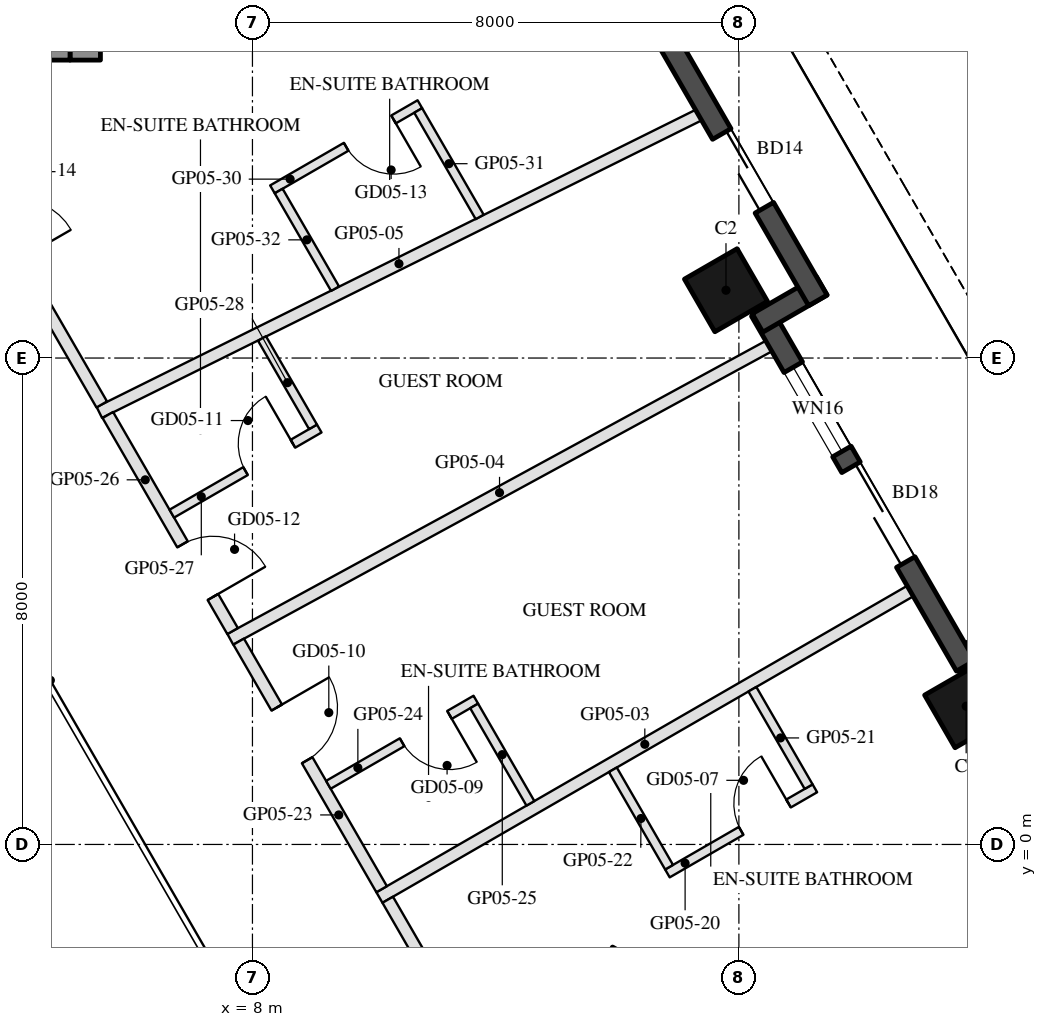
"""IFC4 building model, lengths in metres.
Left out: names, types, materials, properties, quantities, classifications, styles, units other than length and angle.
Written with IfcOpenShell. Run it as: python <this file> out.ifc"""

import sys

from ifc_helpers import new_model, si_unit, direction, frame, frame_2d, origin, origin_2d, place, context, subcontext, project, spatial, rectangle, hollow_rectangle, extrude, element, fill, save


model = new_model("IFC4")
c1 = context("Model", 3, precision=1e-05, world=origin(), true_north=direction((0.0, 1.0)))
c2 = subcontext(c1, "Body", "Model", "MODEL_VIEW")
j1 = project(units=[si_unit("LENGTHUNIT", "METRE"), si_unit("PLANEANGLEUNIT", "RADIAN")], contexts=[c1])
p1 = place(None, origin())
s1 = spatial("IfcSite", under=j1, at=p1, CompositionType="ELEMENT")
p2 = place(p1, origin())
s2 = spatial("IfcBuilding", under=s1, at=p2, CompositionType="ELEMENT")
p3 = place(p2, frame((0.0, 0.0, 79.8)))
s3 = spatial("IfcBuildingStorey", under=s2, at=p3, CompositionType="ELEMENT", Elevation=79.8)
for number, where, z_axis, x_axis in (
    (1, (19.738, 2.273, 0.0), (0.0, 0.0, 1.0), (-0.5, 0.866, 0.0)),
    (2, (15.788, 9.115, 0.0), (0.0, 0.0, 1.0), (-0.5, 0.866, 0.0)),
):
    element("IfcColumn", number, at=place(p3, frame(where, z_axis=z_axis, x_axis=x_axis)), inside=s3, PredefinedType="COLUMN", context=c2, shape_type="SweptSolid", body=[
        extrude(hollow_rectangle(XDim=1.0, YDim=1.0, WallThickness=0.045, at=origin_2d()), origin(), (0.0, 0.0, 1.0), 3.7),
    ])
p4 = place(p3, frame((20.588, 3.601, 0.0), z_axis=(0.0, 0.0, 1.0), x_axis=(-0.866005645448, -0.500034220881, 0.0)))
e3 = element("IfcWall", 3, at=p4, inside=s3, PredefinedType="SOLIDWALL", context=c2, shape_type="SweptSolid", body=[
    extrude(rectangle(XDim=1.22, YDim=0.35, at=frame_2d((0.61, 0.0))), origin(), (0.0, 0.0, 1.0), 3.55),
])
p5 = place(p3, frame((19.729, 2.938, 0.0), z_axis=(0.0, 0.0, 1.0), x_axis=(-0.499976430342, 0.866039011305, 0.0)))
e4 = element("IfcWall", 4, at=p5, inside=s3, PredefinedType="SOLIDWALL", context=c2, shape_type="SweptSolid", body=[
    extrude(rectangle(XDim=6.74, YDim=0.35, at=frame_2d((3.37, 0.0))), origin(), (0.0, 0.0, 1.0), 3.55),
])
p6 = place(p5, frame((1.97, 0.0, 0.0)))
e5 = element("IfcOpeningElement", 5, at=p6, cuts=e4, PredefinedType="OPENING", context=c2, shape_type="SweptSolid", body=[
    extrude(rectangle(XDim=1.8, YDim=2.4, at=frame_2d((0.9, 1.2))), frame((0.0, 0.185, 0.0), z_axis=(0.0, -1.0, 0.0), x_axis=(1.0, 0.0, 0.0)), (0.0, 0.0, 1.0), 0.37),
])
p7 = place(p5, frame((4.07, 0.0, 0.3)))
e6 = element("IfcOpeningElement", 6, at=p7, cuts=e4, PredefinedType="OPENING", context=c2, shape_type="SweptSolid", body=[
    extrude(rectangle(XDim=1.6, YDim=2.65, at=frame_2d((0.8, 1.325))), frame((0.0, 0.185, 0.0), z_axis=(0.0, -1.0, 0.0), x_axis=(1.0, 0.0, 0.0)), (0.0, 0.0, 1.0), 0.37),
])
p8 = place(p3, frame((16.306, 8.577, 0.0), z_axis=(0.0, 0.0, 1.0), x_axis=(0.866092288191, 0.499884134912, 0.0)))
e7 = element("IfcWall", 7, at=p8, inside=s3, PredefinedType="SOLIDWALL", context=c2, shape_type="SweptSolid", body=[
    extrude(rectangle(XDim=1.22, YDim=0.35, at=frame_2d((0.61, 0.0))), origin(), (0.0, 0.0, 1.0), 3.55),
])
p9 = place(p3, frame((17.299, 8.948, 0.0), z_axis=(0.0, 0.0, 1.0), x_axis=(-0.500010041276, 0.866019606374, 0.0)))
e8 = element("IfcWall", 8, at=p9, inside=s3, PredefinedType="SOLIDWALL", context=c2, shape_type="SweptSolid", body=[
    extrude(rectangle(XDim=9.7, YDim=0.35, at=frame_2d((4.85, 0.0))), origin(), (0.0, 0.0, 1.0), 3.55),
])
p10 = place(p9, frame((1.76, 0.0, 0.0)))
e9 = element("IfcOpeningElement", 9, at=p10, cuts=e8, PredefinedType="OPENING", context=c2, shape_type="SweptSolid", body=[
    extrude(rectangle(XDim=1.4, YDim=2.4, at=frame_2d((0.7, 1.2))), frame((0.0, 0.185, 0.0), z_axis=(0.0, -1.0, 0.0), x_axis=(1.0, 0.0, 0.0)), (0.0, 0.0, 1.0), 0.37),
])
p11 = place(p9, frame((4.949, 0.0, 0.3)))
e10 = element("IfcOpeningElement", 10, at=p11, cuts=e8, PredefinedType="OPENING", context=c2, shape_type="SweptSolid", body=[
    extrude(rectangle(XDim=3.0, YDim=2.65, at=frame_2d((1.5, 1.325))), frame((0.0, 0.185, 0.0), z_axis=(0.0, -1.0, 0.0), x_axis=(1.0, 0.0, 0.0)), (0.0, 0.0, 1.0), 0.37),
])
p12 = place(p3, frame((5.25, 12.9, 0.0), z_axis=(0.0, 0.0, 1.0), x_axis=(0.0, 1.0, 0.0)))
e11 = element("IfcWall", 11, at=p12, inside=s3, PredefinedType="SHEAR", context=c2, shape_type="SweptSolid", body=[
    extrude(rectangle(XDim=14.837, YDim=0.5, at=frame_2d((7.418, 0.0))), origin(), (0.0, 0.0, 1.0), 3.5),
])
p13 = place(p3, frame((5.0, 13.1, 0.0), z_axis=(0.0, 0.0, 1.0), x_axis=(-1.0, 0.0, 0.0)))
e12 = element("IfcWall", 12, at=p13, inside=s3, PredefinedType="SHEAR", context=c2, shape_type="SweptSolid", body=[
    extrude(rectangle(XDim=10.0, YDim=0.4, at=frame_2d((5.0, 0.0))), origin(), (0.0, 0.0, 1.0), 3.5),
])
p14 = place(p13, frame((3.55, 0.0, 0.0)))
e13 = element("IfcOpeningElement", 13, at=p14, cuts=e12, PredefinedType="OPENING", context=c2, shape_type="SweptSolid", body=[
    extrude(rectangle(XDim=1.1, YDim=2.1, at=frame_2d((0.55, 1.05))), frame((0.0, 0.21, 0.0), z_axis=(0.0, -1.0, 0.0), x_axis=(1.0, 0.0, 0.0)), (0.0, 0.0, 1.0), 0.42),
])
p15 = place(p13, frame((5.85, 0.0, 0.0)))
e14 = element("IfcOpeningElement", 14, at=p15, cuts=e12, PredefinedType="OPENING", context=c2, shape_type="SweptSolid", body=[
    extrude(rectangle(XDim=1.4, YDim=2.1, at=frame_2d((0.7, 1.05))), frame((0.0, 0.21, 0.0), z_axis=(0.0, -1.0, 0.0), x_axis=(1.0, 0.0, 0.0)), (0.0, 0.0, 1.0), 0.42),
])
p16 = place(p3, frame((18.818, 4.167, 0.0), z_axis=(0.0, 0.0, 1.0), x_axis=(-0.866039179741, -0.499976138585, 0.0)))
e15 = element("IfcWall", 15, at=p16, inside=s3, PredefinedType="PARTITIONING", context=c2, shape_type="SweptSolid", body=[
    extrude(rectangle(XDim=10.08, YDim=0.2, at=frame_2d((5.04, 0.0))), origin(), (0.0, 0.0, 1.0), 2.96),
])
p17 = place(p3, frame((16.491, 8.196, 0.0), z_axis=(0.0, 0.0, 1.0), x_axis=(-0.878274684292, -0.478156437719, 0.0)))
e16 = element("IfcWall", 16, at=p17, inside=s3, PredefinedType="PARTITIONING", context=c2, shape_type="SweptSolid", body=[
    extrude(rectangle(XDim=10.083, YDim=0.2, at=frame_2d((5.042, 0.0))), origin(), (0.0, 0.0, 1.0), 2.96),
])
p18 = place(p3, frame((15.337, 11.996, 0.0), z_axis=(0.0, 0.0, 1.0), x_axis=(-0.895785569399, -0.4444864606, 0.0)))
e17 = element("IfcWall", 17, at=p18, inside=s3, PredefinedType="PARTITIONING", context=c2, shape_type="SweptSolid", body=[
    extrude(rectangle(XDim=11.002, YDim=0.2, at=frame_2d((5.501, 0.0))), origin(), (0.0, 0.0, 1.0), 2.96),
])
p19 = place(p3, frame((10.225, -0.909, 0.0), z_axis=(0.0, 0.0, 1.0), x_axis=(0.500011931275, -0.86601851515, 0.0)))
e18 = element("IfcWall", 18, at=p19, inside=s3, PredefinedType="PARTITIONING", context=c2, shape_type="SweptSolid", body=[
    extrude(rectangle(XDim=4.088, YDim=0.2, at=frame_2d((2.044, 0.0))), origin(), (0.0, 0.0, 1.0), 2.95),
])
p20 = place(p19, frame((1.544, 0.0, 0.0)))
e19 = element("IfcOpeningElement", 19, at=p20, cuts=e18, PredefinedType="OPENING", context=c2, shape_type="SweptSolid", body=[
    extrude(rectangle(XDim=1.0, YDim=2.1, at=frame_2d((0.5, 1.05))), frame((0.0, 0.11, 0.0), z_axis=(0.0, -1.0, 0.0), x_axis=(1.0, 0.0, 0.0)), (0.0, 0.0, 1.0), 0.22),
])
p21 = place(p3, frame((14.824, -0.477, 0.0), z_axis=(0.0, 0.0, 1.0), x_axis=(0.866034573852, 0.49998411664, 0.0)))
e20 = element("IfcWall", 20, at=p21, inside=s3, PredefinedType="PARTITIONING", context=c2, shape_type="SweptSolid", body=[
    extrude(rectangle(XDim=2.8, YDim=0.15, at=frame_2d((1.4, 0.0))), origin(), (0.0, 0.0, 1.0), 2.95),
])
p22 = place(p21, frame((1.4, 0.0, 0.0)))
e21 = element("IfcOpeningElement", 21, at=p22, cuts=e20, PredefinedType="OPENING", context=c2, shape_type="SweptSolid", body=[
    extrude(rectangle(XDim=0.9, YDim=2.1, at=frame_2d((0.45, 1.05))), frame((0.0, 0.085, 0.0), z_axis=(0.0, -1.0, 0.0), x_axis=(1.0, 0.0, 0.0)), (0.0, 0.0, 1.0), 0.17),
])
for number, where, z_axis, x_axis in (
    (22, (17.147, 0.951, 0.0), (0.0, 0.0, 1.0), (-0.5, 0.866, 0.0)),
    (23, (14.852, -0.374, 0.0), (0.0, 0.0, 1.0), (-0.5, 0.866, 0.0)),
):
    element("IfcWall", number, at=place(p3, frame(where, z_axis=z_axis, x_axis=x_axis)), inside=s3, PredefinedType="PARTITIONING", context=c2, shape_type="SweptSolid", body=[
        extrude(rectangle(XDim=1.85, YDim=0.15, at=frame_2d((0.925, 0.0))), origin(), (0.0, 0.0, 1.0), 3.55),
    ])
p23 = place(p3, frame((7.773, 3.336, 0.0), z_axis=(0.0, 0.0, 1.0), x_axis=(0.499969633922, -0.866042934938, 0.0)))
e24 = element("IfcWall", 24, at=p23, inside=s3, PredefinedType="PARTITIONING", context=c2, shape_type="SweptSolid", body=[
    extrude(rectangle(XDim=4.702, YDim=0.2, at=frame_2d((2.351, 0.0))), origin(), (0.0, 0.0, 1.0), 2.95),
])
p24 = place(p23, frame((1.252, 0.0, 0.0)))
e25 = element("IfcOpeningElement", 25, at=p24, cuts=e24, PredefinedType="OPENING", context=c2, shape_type="SweptSolid", body=[
    extrude(rectangle(XDim=1.0, YDim=2.1, at=frame_2d((0.5, 1.05))), frame((0.0, 0.11, 0.0), z_axis=(0.0, -1.0, 0.0), x_axis=(1.0, 0.0, 0.0)), (0.0, 0.0, 1.0), 0.22),
])
p25 = place(p3, frame((11.674, 2.381, 0.0), z_axis=(0.0, 0.0, 1.0), x_axis=(-0.865996816683, -0.500049511043, 0.0)))
e26 = element("IfcWall", 26, at=p25, inside=s3, PredefinedType="PARTITIONING", context=c2, shape_type="SweptSolid", body=[
    extrude(rectangle(XDim=2.8, YDim=0.15, at=frame_2d((1.4, 0.0))), origin(), (0.0, 0.0, 1.0), 2.95),
])
p26 = place(p25, frame((0.5, 0.0, 0.0)))
e27 = element("IfcOpeningElement", 27, at=p26, cuts=e26, PredefinedType="OPENING", context=c2, shape_type="SweptSolid", body=[
    extrude(rectangle(XDim=0.9, YDim=2.1, at=frame_2d((0.45, 1.05))), frame((0.0, 0.085, 0.0), z_axis=(0.0, -1.0, 0.0), x_axis=(1.0, 0.0, 0.0)), (0.0, 0.0, 1.0), 0.17),
])
p27 = place(p3, frame((12.571, 0.676, 0.0), z_axis=(0.0, 0.0, 1.0), x_axis=(-0.500042316284, 0.866000971088, 0.0)))
e28 = element("IfcWall", 28, at=p27, inside=s3, PredefinedType="PARTITIONING", context=c2, shape_type="SweptSolid", body=[
    extrude(rectangle(XDim=1.85, YDim=0.15, at=frame_2d((0.925, 0.0))), origin(), (0.0, 0.0, 1.0), 2.95),
])
p28 = place(p3, frame((5.622, 7.063, 0.0), z_axis=(0.0, 0.0, 1.0), x_axis=(0.500003992843, -0.866023098503, 0.0)))
e29 = element("IfcWall", 29, at=p28, inside=s3, PredefinedType="PARTITIONING", context=c2, shape_type="SweptSolid", body=[
    extrude(rectangle(XDim=4.104, YDim=0.2, at=frame_2d((2.052, 0.0))), origin(), (0.0, 0.0, 1.0), 2.95),
])
p29 = place(p28, frame((2.456, 0.0, 0.0)))
e30 = element("IfcOpeningElement", 30, at=p29, cuts=e29, PredefinedType="OPENING", context=c2, shape_type="SweptSolid", body=[
    extrude(rectangle(XDim=1.0, YDim=2.1, at=frame_2d((0.5, 1.05))), frame((0.0, 0.11, 0.0), z_axis=(0.0, -1.0, 0.0), x_axis=(1.0, 0.0, 0.0)), (0.0, 0.0, 1.0), 0.22),
])
p30 = place(p3, frame((6.674, 5.441, 0.0), z_axis=(0.0, 0.0, 1.0), x_axis=(0.866034573852, 0.49998411664, 0.0)))
e31 = element("IfcWall", 31, at=p30, inside=s3, PredefinedType="PARTITIONING", context=c2, shape_type="SweptSolid", body=[
    extrude(rectangle(XDim=2.8, YDim=0.15, at=frame_2d((1.4, 0.0))), origin(), (0.0, 0.0, 1.0), 3.55),
])
p31 = place(p30, frame((1.4, 0.0, 0.0)))
e32 = element("IfcOpeningElement", 32, at=p31, cuts=e31, PredefinedType="OPENING", context=c2, shape_type="SweptSolid", body=[
    extrude(rectangle(XDim=0.9, YDim=2.1, at=frame_2d((0.45, 1.05))), frame((0.0, 0.085, 0.0), z_axis=(0.0, -1.0, 0.0), x_axis=(1.0, 0.0, 0.0)), (0.0, 0.0, 1.0), 0.17),
])
p32 = place(p3, frame((8.996, 6.868, 0.0), z_axis=(0.0, 0.0, 1.0), x_axis=(-0.499957569697, 0.866049899545, 0.0)))
e33 = element("IfcWall", 33, at=p32, inside=s3, PredefinedType="PARTITIONING", context=c2, shape_type="SweptSolid", body=[
    extrude(rectangle(XDim=1.678, YDim=0.15, at=frame_2d((0.839, 0.0))), origin(), (0.0, 0.0, 1.0), 3.55),
])
p33 = place(p3, frame((2.281, 12.85, 0.0), z_axis=(0.0, 0.0, 1.0), x_axis=(0.500015893381, -0.866016227542, 0.0)))
e34 = element("IfcWall", 34, at=p33, inside=s3, PredefinedType="PARTITIONING", context=c2, shape_type="SweptSolid", body=[
    extrude(rectangle(XDim=6.482, YDim=0.2, at=frame_2d((3.241, 0.0))), origin(), (0.0, 0.0, 1.0), 2.95),
])
p34 = place(p33, frame((2.741, 0.0, 0.0)))
e35 = element("IfcOpeningElement", 35, at=p34, cuts=e34, PredefinedType="OPENING", context=c2, shape_type="SweptSolid", body=[
    extrude(rectangle(XDim=1.0, YDim=2.1, at=frame_2d((0.5, 1.05))), frame((0.0, 0.11, 0.0), z_axis=(0.0, -1.0, 0.0), x_axis=(1.0, 0.0, 0.0)), (0.0, 0.0, 1.0), 0.22),
])
p35 = place(p3, frame((10.753, 12.174, 0.0), z_axis=(0.0, 0.0, 1.0), x_axis=(-0.866034573852, -0.49998411664, 0.0)))
e36 = element("IfcWall", 36, at=p35, inside=s3, PredefinedType="PARTITIONING", context=c2, shape_type="SweptSolid", body=[
    extrude(rectangle(XDim=2.8, YDim=0.15, at=frame_2d((1.4, 0.0))), origin(), (0.0, 0.0, 1.0), 3.55),
])
p36 = place(p35, frame((0.5, 0.0, 0.0)))
e37 = element("IfcOpeningElement", 37, at=p36, cuts=e36, PredefinedType="OPENING", context=c2, shape_type="SweptSolid", body=[
    extrude(rectangle(XDim=0.9, YDim=2.1, at=frame_2d((0.45, 1.05))), frame((0.0, 0.085, 0.0), z_axis=(0.0, -1.0, 0.0), x_axis=(1.0, 0.0, 0.0)), (0.0, 0.0, 1.0), 0.17),
])
p37 = place(p3, frame((11.737, 10.321, 0.0), z_axis=(0.0, 0.0, 1.0), x_axis=(-0.499969802211, 0.866042837784, 0.0)))
e38 = element("IfcWall", 38, at=p37, inside=s3, PredefinedType="PARTITIONING", context=c2, shape_type="SweptSolid", body=[
    extrude(rectangle(XDim=2.022, YDim=0.15, at=frame_2d((1.011, 0.0))), origin(), (0.0, 0.0, 1.0), 2.95),
])
p38 = place(p3, frame((9.358, 9.141, 0.0), z_axis=(0.0, 0.0, 1.0), x_axis=(-0.49996174997, 0.866047486323, 0.0)))
e39 = element("IfcWall", 39, at=p38, inside=s3, PredefinedType="PARTITIONING", context=c2, shape_type="SweptSolid", body=[
    extrude(rectangle(XDim=1.855, YDim=0.15, at=frame_2d((0.927, 0.0))), origin(), (0.0, 0.0, 1.0), 2.95),
])
p39 = place(p6, frame((1.8, 0.0, 0.0), z_axis=(0.0, 0.0, 1.0), x_axis=(-1.0, 0.0, 0.0)))
e40 = element("IfcDoor", 40, at=p39, inside=s3, OperationType="SLIDING_TO_LEFT", PredefinedType="DOOR", context=c2, shape_type="SweptSolid", body=[
    extrude(rectangle(XDim=1.8, YDim=2.4, at=frame_2d((0.9, 1.2))), frame((0.0, 0.025, 0.0), z_axis=(0.0, -1.0, 0.0), x_axis=(1.0, 0.0, 0.0)), (0.0, 0.0, 1.0), 0.05),
])
fill(e5, e40)
p40 = place(p7, origin())
e41 = element("IfcWindow", 41, at=p40, inside=s3, PartitioningType="SINGLE_PANEL", PredefinedType="WINDOW", context=c2, shape_type="SweptSolid", body=[
    extrude(rectangle(XDim=1.6, YDim=2.65, at=frame_2d((0.8, 1.325))), frame((0.0, 0.03, 0.0), z_axis=(0.0, -1.0, 0.0), x_axis=(1.0, 0.0, 0.0)), (0.0, 0.0, 1.0), 0.06),
])
fill(e6, e41)
p41 = place(p10, frame((1.4, 0.0, 0.0), z_axis=(0.0, 0.0, 1.0), x_axis=(-1.0, 0.0, 0.0)))
e42 = element("IfcDoor", 42, at=p41, inside=s3, OperationType="SLIDING_TO_LEFT", PredefinedType="DOOR", context=c2, shape_type="SweptSolid", body=[
    extrude(rectangle(XDim=1.4, YDim=2.4, at=frame_2d((0.7, 1.2))), frame((0.0, 0.025, 0.0), z_axis=(0.0, -1.0, 0.0), x_axis=(1.0, 0.0, 0.0)), (0.0, 0.0, 1.0), 0.05),
])
fill(e9, e42)
p42 = place(p22, origin())
e43 = element("IfcDoor", 43, at=p42, inside=s3, OperationType="SINGLE_SWING_RIGHT", PredefinedType="DOOR", context=c2, shape_type="SweptSolid", body=[
    extrude(rectangle(XDim=0.9, YDim=2.1, at=frame_2d((0.45, 1.05))), frame((0.0, 0.025, 0.0), z_axis=(0.0, -1.0, 0.0), x_axis=(1.0, 0.0, 0.0)), (0.0, 0.0, 1.0), 0.05),
])
fill(e21, e43)
p43 = place(p26, origin())
e44 = element("IfcDoor", 44, at=p43, inside=s3, OperationType="SINGLE_SWING_LEFT", PredefinedType="DOOR", context=c2, shape_type="SweptSolid", body=[
    extrude(rectangle(XDim=0.9, YDim=2.1, at=frame_2d((0.45, 1.05))), frame((0.0, 0.025, 0.0), z_axis=(0.0, -1.0, 0.0), x_axis=(1.0, 0.0, 0.0)), (0.0, 0.0, 1.0), 0.05),
])
fill(e27, e44)
p44 = place(p24, origin())
e45 = element("IfcDoor", 45, at=p44, inside=s3, OperationType="SINGLE_SWING_LEFT", PredefinedType="DOOR", context=c2, shape_type="SweptSolid", body=[
    extrude(rectangle(XDim=1.0, YDim=2.1, at=frame_2d((0.5, 1.05))), frame((0.0, 0.025, 0.0), z_axis=(0.0, -1.0, 0.0), x_axis=(1.0, 0.0, 0.0)), (0.0, 0.0, 1.0), 0.05),
])
fill(e25, e45)
p45 = place(p31, origin())
e46 = element("IfcDoor", 46, at=p45, inside=s3, OperationType="SINGLE_SWING_RIGHT", PredefinedType="DOOR", context=c2, shape_type="SweptSolid", body=[
    extrude(rectangle(XDim=0.9, YDim=2.1, at=frame_2d((0.45, 1.05))), frame((0.0, 0.025, 0.0), z_axis=(0.0, -1.0, 0.0), x_axis=(1.0, 0.0, 0.0)), (0.0, 0.0, 1.0), 0.05),
])
fill(e32, e46)
p46 = place(p29, origin())
e47 = element("IfcDoor", 47, at=p46, inside=s3, OperationType="SINGLE_SWING_RIGHT", PredefinedType="DOOR", context=c2, shape_type="SweptSolid", body=[
    extrude(rectangle(XDim=1.0, YDim=2.1, at=frame_2d((0.5, 1.05))), frame((0.0, 0.025, 0.0), z_axis=(0.0, -1.0, 0.0), x_axis=(1.0, 0.0, 0.0)), (0.0, 0.0, 1.0), 0.05),
])
fill(e30, e47)
p47 = place(p36, origin())
e48 = element("IfcDoor", 48, at=p47, inside=s3, OperationType="SINGLE_SWING_LEFT", PredefinedType="DOOR", context=c2, shape_type="SweptSolid", body=[
    extrude(rectangle(XDim=0.9, YDim=2.1, at=frame_2d((0.45, 1.05))), frame((0.0, 0.025, 0.0), z_axis=(0.0, -1.0, 0.0), x_axis=(1.0, 0.0, 0.0)), (0.0, 0.0, 1.0), 0.05),
])
fill(e37, e48)
save(model, sys.argv[1])
